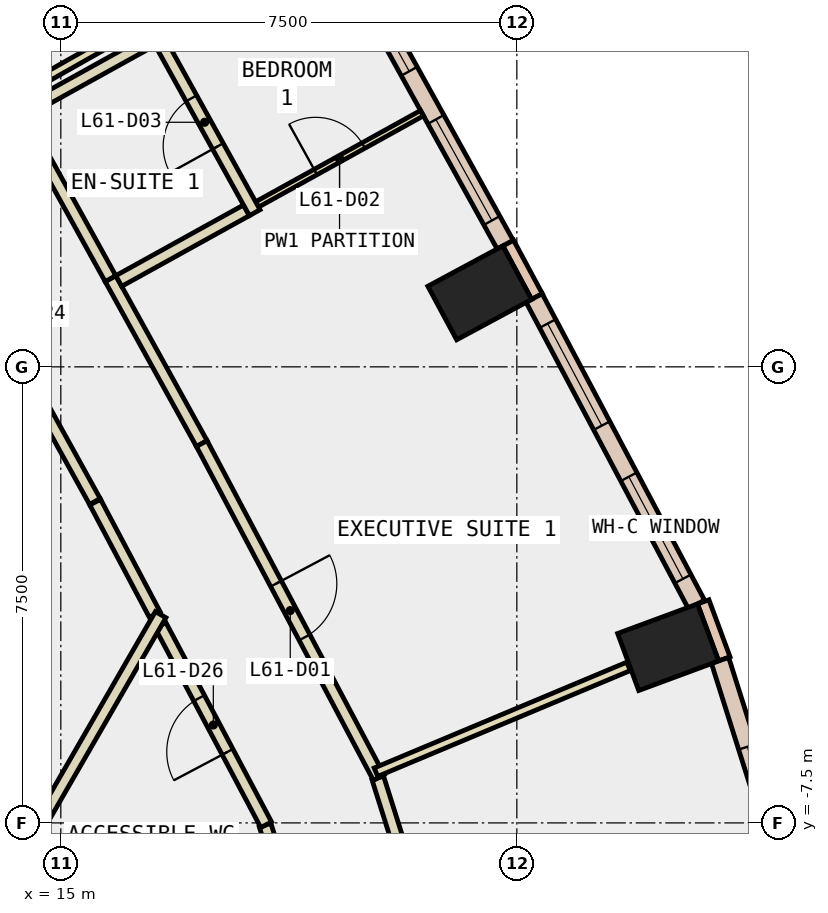
"""IFC4 building model, lengths in metres.
Left out: names, types, materials, properties, quantities, classifications, styles, units other than length and angle.
Written with IfcOpenShell. Run it as: python <this file> out.ifc"""

import sys

from ifc_helpers import new_model, si_unit, direction, frame, frame_2d, origin, origin_2d, place, context, subcontext, project, spatial, rectangle, extrude, element, fill, save


model = new_model("IFC4")
c1 = context("Model", 3, precision=1e-05, world=origin(), true_north=direction((0.0, 1.0)))
c2 = subcontext(c1, "Body", "Model", "MODEL_VIEW")
j1 = project(units=[si_unit("LENGTHUNIT", "METRE"), si_unit("PLANEANGLEUNIT", "RADIAN")], contexts=[c1])
p1 = place(None, origin())
s1 = spatial("IfcSite", under=j1, at=p1, CompositionType="ELEMENT")
p2 = place(p1, origin())
s2 = spatial("IfcBuilding", under=s1, at=p2, CompositionType="ELEMENT")
p3 = place(p2, frame((0.0, 0.0, 266.6)))
s3 = spatial("IfcBuildingStorey", under=s2, at=p3, CompositionType="ELEMENT", Elevation=266.6)
for number, where, z_axis, x_axis in (
    (1, (24.988, -4.611, -0.34), (0.0, 0.0, 1.0), (-0.347, 0.938, 0.0)),
    (2, (21.89, 1.217, -0.34), (0.0, 0.0, 1.0), (-0.474, 0.881, 0.0)),
):
    element("IfcColumn", number, at=place(p3, frame(where, z_axis=z_axis, x_axis=x_axis)), inside=s3, PredefinedType="COLUMN", context=c2, shape_type="SweptSolid", body=[
        extrude(rectangle(XDim=1.0, YDim=1.4, at=origin_2d()), origin(), (0.0, 0.0, 1.0), 3.6),
    ])
p4 = place(p3, frame((7.578, -4.375, -0.34), z_axis=(0.0, 0.0, 1.0), x_axis=(0.866024315419, -0.5000018851, 0.0)))
e3 = element("IfcWall", 3, at=p4, inside=s3, PredefinedType="SHEAR", context=c2, shape_type="SweptSolid", body=[
    extrude(rectangle(XDim=9.0, YDim=0.8, at=frame_2d((4.5, 0.0))), origin(), (0.0, 0.0, 1.0), 3.6),
])
p5 = place(p3, frame((25.912, -4.803, 0.0), z_axis=(0.0, 0.0, 1.0), x_axis=(-0.347107644204, 0.937825294677, 0.0)))
e4 = element("IfcWall", 4, at=p5, inside=s3, PredefinedType="STANDARD", context=c2, shape_type="SweptSolid", body=[
    extrude(rectangle(XDim=1.0, YDim=0.2, at=frame_2d((0.5, 0.0))), origin(), (0.0, 0.0, 1.0), 3.26),
])
p6 = place(p3, frame((22.831, 1.156, 0.0), z_axis=(0.0, 0.0, 1.0), x_axis=(-0.473852444207, 0.880604259085, 0.0)))
e5 = element("IfcWall", 5, at=p6, inside=s3, PredefinedType="STANDARD", context=c2, shape_type="SweptSolid", body=[
    extrude(rectangle(XDim=1.0, YDim=0.2, at=frame_2d((0.5, 0.0))), origin(), (0.0, 0.0, 1.0), 3.26),
])
p7 = place(p3, frame((27.161, -9.004, 0.0), z_axis=(0.0, 0.0, 1.0), x_axis=(-0.30108868778, 0.953596142028, 0.0)))
e6 = element("IfcWall", 6, at=p7, inside=s3, PredefinedType="STANDARD", context=c2, shape_type="SweptSolid", body=[
    extrude(rectangle(XDim=4.38, YDim=0.3, at=frame_2d((2.19, 0.0))), origin(), (0.0, 0.0, 1.0), 3.26),
])
p8 = place(p7, frame((1.49, 0.0, 0.9)))
e7 = element("IfcOpeningElement", 7, at=p8, cuts=e6, PredefinedType="OPENING", context=c2, shape_type="SweptSolid", body=[
    extrude(rectangle(XDim=1.4, YDim=2.0, at=frame_2d((0.7, 1.0))), frame((0.0, 0.16, 0.0), z_axis=(0.0, -1.0, 0.0), x_axis=(1.0, 0.0, 0.0)), (0.0, 0.0, 1.0), 0.32),
])
p9 = place(p3, frame((25.454, -3.907, 0.0), z_axis=(0.0, 0.0, 1.0), x_axis=(-0.468220106253, 0.883611867338, 0.0)))
e8 = element("IfcWall", 8, at=p9, inside=s3, PredefinedType="STANDARD", context=c2, shape_type="SweptSolid", body=[
    extrude(rectangle(XDim=5.703, YDim=0.3, at=frame_2d((2.852, 0.0))), origin(), (0.0, 0.0, 1.0), 3.26),
])
p10 = place(p9, frame((0.476, 0.0, 0.9)))
e9 = element("IfcOpeningElement", 9, at=p10, cuts=e8, PredefinedType="OPENING", context=c2, shape_type="SweptSolid", body=[
    extrude(rectangle(XDim=1.9, YDim=2.0, at=frame_2d((0.95, 1.0))), frame((0.0, 0.16, 0.0), z_axis=(0.0, -1.0, 0.0), x_axis=(1.0, 0.0, 0.0)), (0.0, 0.0, 1.0), 0.32),
])
p11 = place(p9, frame((3.327, 0.0, 0.9)))
e10 = element("IfcOpeningElement", 10, at=p11, cuts=e8, PredefinedType="OPENING", context=c2, shape_type="SweptSolid", body=[
    extrude(rectangle(XDim=1.9, YDim=2.0, at=frame_2d((0.95, 1.0))), frame((0.0, 0.16, 0.0), z_axis=(0.0, -1.0, 0.0), x_axis=(1.0, 0.0, 0.0)), (0.0, 0.0, 1.0), 0.32),
])
p12 = place(p3, frame((22.308, 2.01, 0.0), z_axis=(0.0, 0.0, 1.0), x_axis=(-0.484260568952, 0.874923826032, 0.0)))
e11 = element("IfcWall", 11, at=p12, inside=s3, PredefinedType="STANDARD", context=c2, shape_type="SweptSolid", body=[
    extrude(rectangle(XDim=5.611, YDim=0.3, at=frame_2d((2.805, 0.0))), origin(), (0.0, 0.0, 1.0), 3.26),
])
p13 = place(p12, frame((0.453, 0.0, 0.9)))
e12 = element("IfcOpeningElement", 12, at=p13, cuts=e11, PredefinedType="OPENING", context=c2, shape_type="SweptSolid", body=[
    extrude(rectangle(XDim=1.9, YDim=2.0, at=frame_2d((0.95, 1.0))), frame((0.0, 0.16, 0.0), z_axis=(0.0, -1.0, 0.0), x_axis=(1.0, 0.0, 0.0)), (0.0, 0.0, 1.0), 0.32),
])
p14 = place(p12, frame((3.258, 0.0, 0.9)))
e13 = element("IfcOpeningElement", 13, at=p14, cuts=e11, PredefinedType="OPENING", context=c2, shape_type="SweptSolid", body=[
    extrude(rectangle(XDim=1.9, YDim=2.0, at=frame_2d((0.95, 1.0))), frame((0.0, 0.16, 0.0), z_axis=(0.0, -1.0, 0.0), x_axis=(1.0, 0.0, 0.0)), (0.0, 0.0, 1.0), 0.32),
])
p15 = place(p3, frame((16.545, -4.074, 0.0), z_axis=(0.0, 0.0, 1.0), x_axis=(-0.468321873419, 0.883557934081, 0.0)))
e14 = element("IfcWall", 14, at=p15, inside=s3, PredefinedType="PARTITIONING", context=c2, shape_type="SweptSolid", body=[
    extrude(rectangle(XDim=2.093, YDim=0.2, at=frame_2d((1.046, 0.0))), origin(), (0.0, 0.0, 1.0), 3.26),
])
p16 = place(p3, frame((15.56, -2.214, 0.0), z_axis=(0.0, 0.0, 1.0), x_axis=(-0.484323615817, 0.874888927329, 0.0)))
e15 = element("IfcWall", 15, at=p16, inside=s3, PredefinedType="PARTITIONING", context=c2, shape_type="SweptSolid", body=[
    extrude(rectangle(XDim=4.747, YDim=0.2, at=frame_2d((2.374, 0.0))), origin(), (0.0, 0.0, 1.0), 3.26),
])
p17 = place(p16, frame((1.874, 0.0, 0.0)))
e16 = element("IfcOpeningElement", 16, at=p17, cuts=e15, PredefinedType="OPENING", context=c2, shape_type="SweptSolid", body=[
    extrude(rectangle(XDim=1.0, YDim=2.1, at=frame_2d((0.5, 1.05))), frame((0.0, 0.11, 0.0), z_axis=(0.0, -1.0, 0.0), x_axis=(1.0, 0.0, 0.0)), (0.0, 0.0, 1.0), 0.22),
])
p18 = place(p3, frame((19.104, -9.891, 0.0), z_axis=(0.0, 0.0, 1.0), x_axis=(-0.301325410186, 0.953521366922, 0.0)))
e17 = element("IfcWall", 17, at=p18, inside=s3, PredefinedType="PARTITIONING", context=c2, shape_type="SweptSolid", body=[
    extrude(rectangle(XDim=2.469, YDim=0.2, at=frame_2d((1.234, 0.0))), origin(), (0.0, 0.0, 1.0), 3.26),
])
p19 = place(p3, frame((18.377, -7.53, 0.0), z_axis=(0.0, 0.0, 1.0), x_axis=(-0.468214048123, 0.883615077474, 0.0)))
e18 = element("IfcWall", 18, at=p19, inside=s3, PredefinedType="PARTITIONING", context=c2, shape_type="SweptSolid", body=[
    extrude(rectangle(XDim=3.712, YDim=0.2, at=frame_2d((1.856, 0.0))), origin(), (0.0, 0.0, 1.0), 3.26),
])
p20 = place(p19, frame((1.356, 0.0, 0.0)))
e19 = element("IfcOpeningElement", 19, at=p20, cuts=e18, PredefinedType="OPENING", context=c2, shape_type="SweptSolid", body=[
    extrude(rectangle(XDim=1.0, YDim=2.1, at=frame_2d((0.5, 1.05))), frame((0.0, 0.11, 0.0), z_axis=(0.0, -1.0, 0.0), x_axis=(1.0, 0.0, 0.0)), (0.0, 0.0, 1.0), 0.22),
])
p21 = place(p3, frame((20.213, -6.761, 0.0), z_axis=(0.0, 0.0, 1.0), x_axis=(0.301331608119, -0.953519408271, 0.0)))
e20 = element("IfcWall", 20, at=p21, inside=s3, PredefinedType="PARTITIONING", context=c2, shape_type="SweptSolid", body=[
    extrude(rectangle(XDim=3.209, YDim=0.2, at=frame_2d((1.604, 0.0))), origin(), (0.0, 0.0, 1.0), 3.26),
])
p22 = place(p3, frame((15.817, 1.451, 0.0), z_axis=(0.0, 0.0, 1.0), x_axis=(0.48417811398, -0.874969458863, 0.0)))
e21 = element("IfcWall", 21, at=p22, inside=s3, PredefinedType="PARTITIONING", context=c2, shape_type="SweptSolid", body=[
    extrude(rectangle(XDim=3.101, YDim=0.2, at=frame_2d((1.55, 0.0))), origin(), (0.0, 0.0, 1.0), 3.26),
])
p23 = place(p3, frame((17.318, -1.262, 0.0), z_axis=(0.0, 0.0, 1.0), x_axis=(0.468313568794, -0.883562335822, 0.0)))
e22 = element("IfcWall", 22, at=p23, inside=s3, PredefinedType="PARTITIONING", context=c2, shape_type="SweptSolid", body=[
    extrude(rectangle(XDim=6.216, YDim=0.2, at=frame_2d((3.108, 0.0))), origin(), (0.0, 0.0, 1.0), 3.26),
])
p24 = place(p23, frame((2.608, 0.0, 0.0)))
e23 = element("IfcOpeningElement", 23, at=p24, cuts=e22, PredefinedType="OPENING", context=c2, shape_type="SweptSolid", body=[
    extrude(rectangle(XDim=1.0, YDim=2.1, at=frame_2d((0.5, 1.05))), frame((0.0, 0.11, 0.0), z_axis=(0.0, -1.0, 0.0), x_axis=(1.0, 0.0, 0.0)), (0.0, 0.0, 1.0), 0.22),
])
p25 = place(p3, frame((14.267, 4.25, 0.0), z_axis=(0.0, 0.0, 1.0), x_axis=(0.4843920198, -0.874851056554, 0.0)))
e24 = element("IfcWall", 24, at=p25, inside=s3, PredefinedType="PARTITIONING", context=c2, shape_type="SweptSolid", body=[
    extrude(rectangle(XDim=3.199, YDim=0.2, at=frame_2d((1.6, 0.0))), origin(), (0.0, 0.0, 1.0), 3.26),
])
p26 = place(p3, frame((16.642, -4.075, 0.0), z_axis=(0.0, 0.0, 1.0), x_axis=(-0.49980426207, -0.866138383641, 0.0)))
e25 = element("IfcWall", 25, at=p26, inside=s3, PredefinedType="PARTITIONING", context=c2, shape_type="SweptSolid", body=[
    extrude(rectangle(XDim=4.392, YDim=0.2, at=frame_2d((2.196, 0.0))), origin(), (0.0, 0.0, 1.0), 3.26),
])
p27 = place(p3, frame((20.183, -6.666, 0.0), z_axis=(0.0, 0.0, 1.0), x_axis=(0.922347108299, 0.386362280525, 0.0)))
e26 = element("IfcWall", 26, at=p27, inside=s3, PredefinedType="PARTITIONING", context=c2, shape_type="SweptSolid", body=[
    extrude(rectangle(XDim=4.503, YDim=0.15, at=frame_2d((2.252, 0.0))), origin(), (0.0, 0.0, 1.0), 3.26),
])
p28 = place(p3, frame((18.228, 2.671, 0.0), z_axis=(0.0, 0.0, 1.0), x_axis=(0.874895591854, 0.484311576729, 0.0)))
e27 = element("IfcWall", 27, at=p28, inside=s3, PredefinedType="PARTITIONING", context=c2, shape_type="SweptSolid", body=[
    extrude(rectangle(XDim=3.1, YDim=0.1, at=frame_2d((1.55, 0.0))), origin(), (0.0, 0.0, 1.0), 3.26),
])
p29 = place(p28, frame((1.1, 0.0, 0.0)))
e28 = element("IfcOpeningElement", 28, at=p29, cuts=e27, PredefinedType="OPENING", context=c2, shape_type="SweptSolid", body=[
    extrude(rectangle(XDim=0.9, YDim=2.1, at=frame_2d((0.45, 1.05))), frame((0.0, 0.06, 0.0), z_axis=(0.0, -1.0, 0.0), x_axis=(1.0, 0.0, 0.0)), (0.0, 0.0, 1.0), 0.12),
])
p30 = place(p3, frame((15.953, 1.412, 0.0), z_axis=(0.0, 0.0, 1.0), x_axis=(0.875014790305, 0.484096185429, 0.0)))
e29 = element("IfcWall", 29, at=p30, inside=s3, PredefinedType="PARTITIONING", context=c2, shape_type="SweptSolid", body=[
    extrude(rectangle(XDim=2.4, YDim=0.2, at=frame_2d((1.2, 0.0))), origin(), (0.0, 0.0, 1.0), 3.26),
])
p31 = place(p3, frame((18.189, 2.535, 0.0), z_axis=(0.0, 0.0, 1.0), x_axis=(-0.484447408253, 0.874820386501, 0.0)))
e30 = element("IfcWall", 30, at=p31, inside=s3, PredefinedType="PARTITIONING", context=c2, shape_type="SweptSolid", body=[
    extrude(rectangle(XDim=3.4, YDim=0.2, at=frame_2d((1.7, 0.0))), origin(), (0.0, 0.0, 1.0), 3.26),
])
p32 = place(p31, frame((1.25, 0.0, 0.0)))
e31 = element("IfcOpeningElement", 31, at=p32, cuts=e30, PredefinedType="OPENING", context=c2, shape_type="SweptSolid", body=[
    extrude(rectangle(XDim=0.9, YDim=2.1, at=frame_2d((0.45, 1.05))), frame((0.0, 0.11, 0.0), z_axis=(0.0, -1.0, 0.0), x_axis=(1.0, 0.0, 0.0)), (0.0, 0.0, 1.0), 0.22),
])
p33 = place(p3, frame((16.503, 5.374, 0.0), z_axis=(0.0, 0.0, 1.0), x_axis=(-0.874847389013, -0.484398643615, 0.0)))
e32 = element("IfcWall", 32, at=p33, inside=s3, PredefinedType="PARTITIONING", context=c2, shape_type="SweptSolid", body=[
    extrude(rectangle(XDim=2.5, YDim=0.2, at=frame_2d((1.25, 0.0))), origin(), (0.0, 0.0, 1.0), 3.26),
])
p34 = place(p3, frame((14.083, 4.377, 0.0), z_axis=(0.0, 0.0, 1.0), x_axis=(0.870415885751, 0.492317159799, 0.0)))
e33 = element("IfcWall", 33, at=p34, inside=s3, PredefinedType="PARTITIONING", context=c2, shape_type="SweptSolid", body=[
    extrude(rectangle(XDim=4.581, YDim=0.15, at=frame_2d((2.29, 0.0))), origin(), (0.0, 0.0, 1.0), 3.26),
])
p35 = place(p8, origin())
e34 = element("IfcWindow", 34, at=p35, inside=s3, PartitioningType="SINGLE_PANEL", PredefinedType="WINDOW", context=c2, shape_type="SweptSolid", body=[
    extrude(rectangle(XDim=1.4, YDim=2.0, at=frame_2d((0.7, 1.0))), frame((0.0, 0.03, 0.0), z_axis=(0.0, -1.0, 0.0), x_axis=(1.0, 0.0, 0.0)), (0.0, 0.0, 1.0), 0.06),
])
fill(e7, e34)
p36 = place(p10, origin())
e35 = element("IfcWindow", 35, at=p36, inside=s3, PartitioningType="SINGLE_PANEL", PredefinedType="WINDOW", context=c2, shape_type="SweptSolid", body=[
    extrude(rectangle(XDim=1.9, YDim=2.0, at=frame_2d((0.95, 1.0))), frame((0.0, 0.03, 0.0), z_axis=(0.0, -1.0, 0.0), x_axis=(1.0, 0.0, 0.0)), (0.0, 0.0, 1.0), 0.06),
])
fill(e9, e35)
p37 = place(p11, origin())
e36 = element("IfcWindow", 36, at=p37, inside=s3, PartitioningType="SINGLE_PANEL", PredefinedType="WINDOW", context=c2, shape_type="SweptSolid", body=[
    extrude(rectangle(XDim=1.9, YDim=2.0, at=frame_2d((0.95, 1.0))), frame((0.0, 0.03, 0.0), z_axis=(0.0, -1.0, 0.0), x_axis=(1.0, 0.0, 0.0)), (0.0, 0.0, 1.0), 0.06),
])
fill(e10, e36)
p38 = place(p13, origin())
e37 = element("IfcWindow", 37, at=p38, inside=s3, PartitioningType="SINGLE_PANEL", PredefinedType="WINDOW", context=c2, shape_type="SweptSolid", body=[
    extrude(rectangle(XDim=1.9, YDim=2.0, at=frame_2d((0.95, 1.0))), frame((0.0, 0.03, 0.0), z_axis=(0.0, -1.0, 0.0), x_axis=(1.0, 0.0, 0.0)), (0.0, 0.0, 1.0), 0.06),
])
fill(e12, e37)
p39 = place(p14, origin())
e38 = element("IfcWindow", 38, at=p39, inside=s3, PartitioningType="SINGLE_PANEL", PredefinedType="WINDOW", context=c2, shape_type="SweptSolid", body=[
    extrude(rectangle(XDim=1.9, YDim=2.0, at=frame_2d((0.95, 1.0))), frame((0.0, 0.03, 0.0), z_axis=(0.0, -1.0, 0.0), x_axis=(1.0, 0.0, 0.0)), (0.0, 0.0, 1.0), 0.06),
])
fill(e13, e38)
p40 = place(p24, origin())
e39 = element("IfcDoor", 39, at=p40, inside=s3, OperationType="SINGLE_SWING_LEFT", PredefinedType="DOOR", context=c2, shape_type="SweptSolid", body=[
    extrude(rectangle(XDim=1.0, YDim=2.1, at=frame_2d((0.5, 1.05))), frame((0.0, 0.025, 0.0), z_axis=(0.0, -1.0, 0.0), x_axis=(1.0, 0.0, 0.0)), (0.0, 0.0, 1.0), 0.05),
])
fill(e23, e39)
p41 = place(p29, origin())
e40 = element("IfcDoor", 40, at=p41, inside=s3, OperationType="SINGLE_SWING_RIGHT", PredefinedType="DOOR", context=c2, shape_type="SweptSolid", body=[
    extrude(rectangle(XDim=0.9, YDim=2.1, at=frame_2d((0.45, 1.05))), frame((0.0, 0.025, 0.0), z_axis=(0.0, -1.0, 0.0), x_axis=(1.0, 0.0, 0.0)), (0.0, 0.0, 1.0), 0.05),
])
fill(e28, e40)
p42 = place(p32, origin())
e41 = element("IfcDoor", 41, at=p42, inside=s3, OperationType="SINGLE_SWING_LEFT", PredefinedType="DOOR", context=c2, shape_type="SweptSolid", body=[
    extrude(rectangle(XDim=0.9, YDim=2.1, at=frame_2d((0.45, 1.05))), frame((0.0, 0.025, 0.0), z_axis=(0.0, -1.0, 0.0), x_axis=(1.0, 0.0, 0.0)), (0.0, 0.0, 1.0), 0.05),
])
fill(e31, e41)
p43 = place(p20, origin())
e42 = element("IfcDoor", 42, at=p43, inside=s3, OperationType="SINGLE_SWING_RIGHT", PredefinedType="DOOR", context=c2, shape_type="SweptSolid", body=[
    extrude(rectangle(XDim=1.0, YDim=2.1, at=frame_2d((0.5, 1.05))), frame((0.0, 0.025, 0.0), z_axis=(0.0, -1.0, 0.0), x_axis=(1.0, 0.0, 0.0)), (0.0, 0.0, 1.0), 0.05),
])
fill(e19, e42)
save(model, sys.argv[1])
